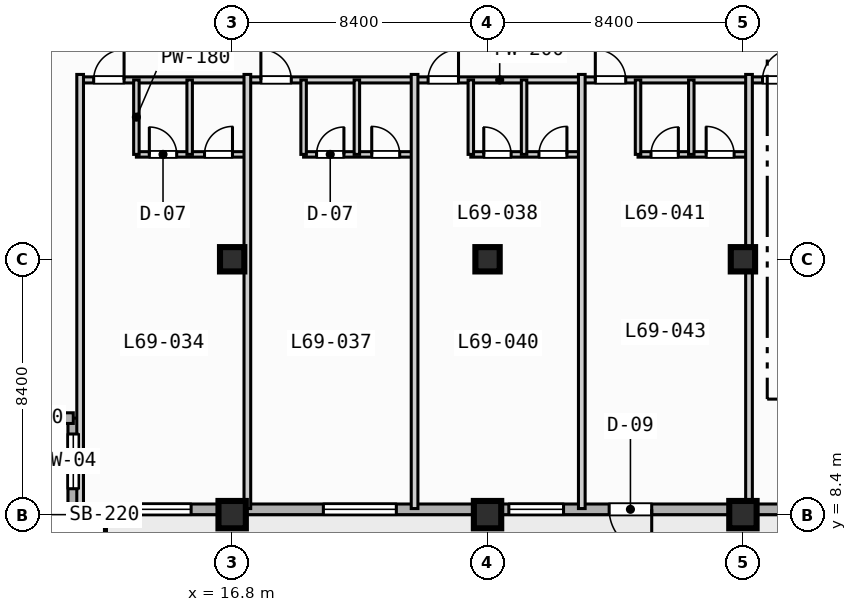
"""IFC4 building model, lengths in metres.
Left out: names, types, materials, properties, quantities, classifications, styles, units other than length and angle.
Written with IfcOpenShell. Run it as: python <this file> out.ifc"""

import sys

from ifc_helpers import new_model, si_unit, direction, frame, frame_2d, origin, origin_2d, place, context, subcontext, project, spatial, rectangle, extrude, element, fill, save


model = new_model("IFC4")
c1 = context("Model", 3, precision=1e-05, world=origin(), true_north=direction((0.0, 1.0)))
c2 = subcontext(c1, "Body", "Model", "MODEL_VIEW")
j1 = project(units=[si_unit("LENGTHUNIT", "METRE"), si_unit("PLANEANGLEUNIT", "RADIAN")], contexts=[c1])
p1 = place(None, origin())
s1 = spatial("IfcSite", under=j1, at=p1, CompositionType="ELEMENT")
p2 = place(p1, origin())
s2 = spatial("IfcBuilding", under=s1, at=p2, CompositionType="ELEMENT")
p3 = place(p2, frame((0.0, 0.0, 278.6)))
s3 = spatial("IfcBuildingStorey", under=s2, at=p3, CompositionType="ELEMENT", Elevation=278.6)
p4 = place(p3, frame((16.8, 8.4, 0.0), z_axis=(0.0, 0.0, 1.0), x_axis=(1.0, 0.0, 0.0)))
e1 = element("IfcColumn", 1, at=p4, inside=s3, PredefinedType="COLUMN", context=c2, shape_type="SweptSolid", body=[
    extrude(rectangle(XDim=0.9, YDim=0.9, at=origin_2d()), origin(), (0.0, 0.0, 1.0), 3.7),
])
p5 = place(p3, frame((16.8, 16.8, 0.0), z_axis=(0.0, 0.0, 1.0), x_axis=(1.0, 0.0, 0.0)))
e2 = element("IfcColumn", 2, at=p5, inside=s3, PredefinedType="COLUMN", context=c2, shape_type="SweptSolid", body=[
    extrude(rectangle(XDim=0.8, YDim=0.8, at=origin_2d()), origin(), (0.0, 0.0, 1.0), 3.7),
])
p6 = place(p3, frame((25.2, 8.4, 0.0), z_axis=(0.0, 0.0, 1.0), x_axis=(1.0, 0.0, 0.0)))
e3 = element("IfcColumn", 3, at=p6, inside=s3, PredefinedType="COLUMN", context=c2, shape_type="SweptSolid", body=[
    extrude(rectangle(XDim=0.9, YDim=0.9, at=origin_2d()), origin(), (0.0, 0.0, 1.0), 3.7),
])
p7 = place(p3, frame((25.2, 16.8, 0.0), z_axis=(0.0, 0.0, 1.0), x_axis=(1.0, 0.0, 0.0)))
e4 = element("IfcColumn", 4, at=p7, inside=s3, PredefinedType="COLUMN", context=c2, shape_type="SweptSolid", body=[
    extrude(rectangle(XDim=0.8, YDim=0.8, at=origin_2d()), origin(), (0.0, 0.0, 1.0), 3.7),
])
p8 = place(p3, frame((33.6, 8.4, 0.0), z_axis=(0.0, 0.0, 1.0), x_axis=(1.0, 0.0, 0.0)))
e5 = element("IfcColumn", 5, at=p8, inside=s3, PredefinedType="COLUMN", context=c2, shape_type="SweptSolid", body=[
    extrude(rectangle(XDim=0.9, YDim=0.9, at=origin_2d()), origin(), (0.0, 0.0, 1.0), 3.7),
])
p9 = place(p3, frame((33.6, 16.8, 0.0), z_axis=(0.0, 0.0, 1.0), x_axis=(1.0, 0.0, 0.0)))
e6 = element("IfcColumn", 6, at=p9, inside=s3, PredefinedType="COLUMN", context=c2, shape_type="SweptSolid", body=[
    extrude(rectangle(XDim=0.8, YDim=0.8, at=origin_2d()), origin(), (0.0, 0.0, 1.0), 3.7),
])
p10 = place(p3, frame((11.575, 8.575, 0.0), z_axis=(0.0, 0.0, 1.0), x_axis=(0.0, 1.0, 0.0)))
e7 = element("IfcWall", 7, at=p10, inside=s3, PredefinedType="STANDARD", context=c2, shape_type="SweptSolid", body=[
    extrude(rectangle(XDim=3.0, YDim=0.35, at=frame_2d((1.5, 0.0))), origin(), (0.0, 0.0, 1.0), 3.47),
])
p11 = place(p10, frame((0.677, 0.0, 0.85)))
e8 = element("IfcOpeningElement", 8, at=p11, cuts=e7, PredefinedType="OPENING", context=c2, shape_type="SweptSolid", body=[
    extrude(rectangle(XDim=1.8, YDim=1.8, at=frame_2d((0.9, 0.9))), frame((0.0, 0.185, 0.0), z_axis=(0.0, -1.0, 0.0), x_axis=(1.0, 0.0, 0.0)), (0.0, 0.0, 1.0), 0.37),
])
p12 = place(p3, frame((11.575, 11.575, 0.0), z_axis=(0.0, 0.0, 1.0), x_axis=(-1.0, 0.0, 0.0)))
e9 = element("IfcWall", 9, at=p12, inside=s3, PredefinedType="STANDARD", context=c2, shape_type="SweptSolid", body=[
    extrude(rectangle(XDim=3.0, YDim=0.35, at=frame_2d((1.5, 0.0))), origin(), (0.0, 0.0, 1.0), 3.47),
])
p13 = place(p3, frame((72.425, 8.575, 0.0), z_axis=(0.0, 0.0, 1.0), x_axis=(-1.0, 0.0, 0.0)))
e10 = element("IfcWall", 10, at=p13, inside=s3, PredefinedType="STANDARD", context=c2, shape_type="SweptSolid", body=[
    extrude(rectangle(XDim=60.85, YDim=0.35, at=frame_2d((30.425, 0.0))), origin(), (0.0, 0.0, 1.0), 3.47),
])
p14 = place(p13, frame((41.825, 0.0, 0.0)))
e11 = element("IfcOpeningElement", 11, at=p14, cuts=e10, PredefinedType="OPENING", context=c2, shape_type="SweptSolid", body=[
    extrude(rectangle(XDim=1.4, YDim=2.2, at=frame_2d((0.7, 1.1))), frame((0.0, 0.185, 0.0), z_axis=(0.0, -1.0, 0.0), x_axis=(1.0, 0.0, 0.0)), (0.0, 0.0, 1.0), 0.37),
])
p15 = place(p13, frame((50.225, 0.0, 0.85)))
e12 = element("IfcOpeningElement", 12, at=p15, cuts=e10, PredefinedType="OPENING", context=c2, shape_type="SweptSolid", body=[
    extrude(rectangle(XDim=2.4, YDim=1.95, at=frame_2d((1.2, 0.975))), frame((0.0, 0.185, 0.0), z_axis=(0.0, -1.0, 0.0), x_axis=(1.0, 0.0, 0.0)), (0.0, 0.0, 1.0), 0.37),
])
p16 = place(p13, frame((33.425, 0.0, 0.85)))
e13 = element("IfcOpeningElement", 13, at=p16, cuts=e10, PredefinedType="OPENING", context=c2, shape_type="SweptSolid", body=[
    extrude(rectangle(XDim=2.4, YDim=1.95, at=frame_2d((1.2, 0.975))), frame((0.0, 0.185, 0.0), z_axis=(0.0, -1.0, 0.0), x_axis=(1.0, 0.0, 0.0)), (0.0, 0.0, 1.0), 0.37),
])
p17 = place(p13, frame((25.325, 0.0, 0.85)))
e14 = element("IfcOpeningElement", 14, at=p17, cuts=e10, PredefinedType="OPENING", context=c2, shape_type="SweptSolid", body=[
    extrude(rectangle(XDim=1.8, YDim=1.8, at=frame_2d((0.9, 0.9))), frame((0.0, 0.185, 0.0), z_axis=(0.0, -1.0, 0.0), x_axis=(1.0, 0.0, 0.0)), (0.0, 0.0, 1.0), 0.37),
])
p18 = place(p13, frame((56.975, 0.0, 0.85)))
e15 = element("IfcOpeningElement", 15, at=p18, cuts=e10, PredefinedType="OPENING", context=c2, shape_type="SweptSolid", body=[
    extrude(rectangle(XDim=1.8, YDim=1.8, at=frame_2d((0.9, 0.9))), frame((0.0, 0.185, 0.0), z_axis=(0.0, -1.0, 0.0), x_axis=(1.0, 0.0, 0.0)), (0.0, 0.0, 1.0), 0.37),
])
p19 = place(p13, frame((44.725, 0.0, 0.85)))
e16 = element("IfcOpeningElement", 16, at=p19, cuts=e10, PredefinedType="OPENING", context=c2, shape_type="SweptSolid", body=[
    extrude(rectangle(XDim=1.8, YDim=1.8, at=frame_2d((0.9, 0.9))), frame((0.0, 0.185, 0.0), z_axis=(0.0, -1.0, 0.0), x_axis=(1.0, 0.0, 0.0)), (0.0, 0.0, 1.0), 0.37),
])
p20 = place(p3, frame((11.8, 22.7, 0.0), z_axis=(0.0, 0.0, 1.0), x_axis=(1.0, 0.0, 0.0)))
e17 = element("IfcWall", 17, at=p20, inside=s3, PredefinedType="PARTITIONING", context=c2, shape_type="SweptSolid", body=[
    extrude(rectangle(XDim=27.6, YDim=0.2, at=frame_2d((13.8, 0.0))), origin(), (0.0, 0.0, 1.0), 3.47),
])
p21 = place(p20, frame((0.445, 0.0, 0.0)))
e18 = element("IfcOpeningElement", 18, at=p21, cuts=e17, PredefinedType="OPENING", context=c2, shape_type="SweptSolid", body=[
    extrude(rectangle(XDim=1.0, YDim=2.15, at=frame_2d((0.5, 1.075))), frame((0.0, 0.11, 0.0), z_axis=(0.0, -1.0, 0.0), x_axis=(1.0, 0.0, 0.0)), (0.0, 0.0, 1.0), 0.22),
])
p22 = place(p20, frame((5.945, 0.0, 0.0)))
e19 = element("IfcOpeningElement", 19, at=p22, cuts=e17, PredefinedType="OPENING", context=c2, shape_type="SweptSolid", body=[
    extrude(rectangle(XDim=1.0, YDim=2.15, at=frame_2d((0.5, 1.075))), frame((0.0, 0.11, 0.0), z_axis=(0.0, -1.0, 0.0), x_axis=(1.0, 0.0, 0.0)), (0.0, 0.0, 1.0), 0.22),
])
p23 = place(p20, frame((11.445, 0.0, 0.0)))
e20 = element("IfcOpeningElement", 20, at=p23, cuts=e17, PredefinedType="OPENING", context=c2, shape_type="SweptSolid", body=[
    extrude(rectangle(XDim=1.0, YDim=2.15, at=frame_2d((0.5, 1.075))), frame((0.0, 0.11, 0.0), z_axis=(0.0, -1.0, 0.0), x_axis=(1.0, 0.0, 0.0)), (0.0, 0.0, 1.0), 0.22),
])
p24 = place(p20, frame((16.945, 0.0, 0.0)))
e21 = element("IfcOpeningElement", 21, at=p24, cuts=e17, PredefinedType="OPENING", context=c2, shape_type="SweptSolid", body=[
    extrude(rectangle(XDim=1.0, YDim=2.15, at=frame_2d((0.5, 1.075))), frame((0.0, 0.11, 0.0), z_axis=(0.0, -1.0, 0.0), x_axis=(1.0, 0.0, 0.0)), (0.0, 0.0, 1.0), 0.22),
])
p25 = place(p20, frame((22.445, 0.0, 0.0)))
e22 = element("IfcOpeningElement", 22, at=p25, cuts=e17, PredefinedType="OPENING", context=c2, shape_type="SweptSolid", body=[
    extrude(rectangle(XDim=1.0, YDim=2.15, at=frame_2d((0.5, 1.075))), frame((0.0, 0.11, 0.0), z_axis=(0.0, -1.0, 0.0), x_axis=(1.0, 0.0, 0.0)), (0.0, 0.0, 1.0), 0.22),
])
p26 = place(p3, frame((11.8, 8.6, 0.0), z_axis=(0.0, 0.0, 1.0), x_axis=(0.0, 1.0, 0.0)))
e23 = element("IfcWall", 23, at=p26, inside=s3, PredefinedType="PARTITIONING", context=c2, shape_type="SweptSolid", body=[
    extrude(rectangle(XDim=14.28, YDim=0.22, at=frame_2d((7.14, 0.0))), origin(), (0.0, 0.0, 1.0), 3.47),
])
p27 = place(p3, frame((13.65, 20.25, 0.0), z_axis=(0.0, 0.0, 1.0), x_axis=(1.0, 0.0, 0.0)))
e24 = element("IfcWall", 24, at=p27, inside=s3, PredefinedType="PLUMBINGWALL", context=c2, shape_type="SweptSolid", body=[
    extrude(rectangle(XDim=3.65, YDim=0.18, at=frame_2d((1.825, 0.0))), origin(), (0.0, 0.0, 1.0), 3.47),
])
p28 = place(p27, frame((0.426, 0.0, 0.0)))
e25 = element("IfcOpeningElement", 25, at=p28, cuts=e24, PredefinedType="OPENING", context=c2, shape_type="SweptSolid", body=[
    extrude(rectangle(XDim=0.9, YDim=2.1, at=frame_2d((0.45, 1.05))), frame((0.0, 0.1, 0.0), z_axis=(0.0, -1.0, 0.0), x_axis=(1.0, 0.0, 0.0)), (0.0, 0.0, 1.0), 0.2),
])
p29 = place(p27, frame((2.241, 0.0, 0.0)))
e26 = element("IfcOpeningElement", 26, at=p29, cuts=e24, PredefinedType="OPENING", context=c2, shape_type="SweptSolid", body=[
    extrude(rectangle(XDim=0.92, YDim=2.1, at=frame_2d((0.46, 1.05))), frame((0.0, 0.1, 0.0), z_axis=(0.0, -1.0, 0.0), x_axis=(1.0, 0.0, 0.0)), (0.0, 0.0, 1.0), 0.2),
])
for number, where, z_axis, x_axis in (
    (27, (13.65, 20.25, 0.0), (0.0, 0.0, 1.0), (0.0, 1.0, 0.0)),
    (28, (15.402, 20.25, 0.0), (0.0, 0.0, 1.0), (0.0, 1.0, 0.0)),
):
    element("IfcWall", number, at=place(p3, frame(where, z_axis=z_axis, x_axis=x_axis)), inside=s3, PredefinedType="PLUMBINGWALL", context=c2, shape_type="SweptSolid", body=[
        extrude(rectangle(XDim=2.45, YDim=0.18, at=frame_2d((1.225, 0.0))), origin(), (0.0, 0.0, 1.0), 3.47),
    ])
p30 = place(p3, frame((17.3, 8.6, 0.0), z_axis=(0.0, 0.0, 1.0), x_axis=(0.0, 1.0, 0.0)))
e29 = element("IfcWall", 29, at=p30, inside=s3, PredefinedType="PARTITIONING", context=c2, shape_type="SweptSolid", body=[
    extrude(rectangle(XDim=14.28, YDim=0.22, at=frame_2d((7.14, 0.0))), origin(), (0.0, 0.0, 1.0), 3.47),
])
p31 = place(p3, frame((19.15, 20.25, 0.0), z_axis=(0.0, 0.0, 1.0), x_axis=(1.0, 0.0, 0.0)))
e30 = element("IfcWall", 30, at=p31, inside=s3, PredefinedType="PLUMBINGWALL", context=c2, shape_type="SweptSolid", body=[
    extrude(rectangle(XDim=3.65, YDim=0.18, at=frame_2d((1.825, 0.0))), origin(), (0.0, 0.0, 1.0), 3.47),
])
p32 = place(p31, frame((0.426, 0.0, 0.0)))
e31 = element("IfcOpeningElement", 31, at=p32, cuts=e30, PredefinedType="OPENING", context=c2, shape_type="SweptSolid", body=[
    extrude(rectangle(XDim=0.9, YDim=2.1, at=frame_2d((0.45, 1.05))), frame((0.0, 0.1, 0.0), z_axis=(0.0, -1.0, 0.0), x_axis=(1.0, 0.0, 0.0)), (0.0, 0.0, 1.0), 0.2),
])
p33 = place(p31, frame((2.241, 0.0, 0.0)))
e32 = element("IfcOpeningElement", 32, at=p33, cuts=e30, PredefinedType="OPENING", context=c2, shape_type="SweptSolid", body=[
    extrude(rectangle(XDim=0.92, YDim=2.1, at=frame_2d((0.46, 1.05))), frame((0.0, 0.1, 0.0), z_axis=(0.0, -1.0, 0.0), x_axis=(1.0, 0.0, 0.0)), (0.0, 0.0, 1.0), 0.2),
])
for number, where, z_axis, x_axis in (
    (33, (19.15, 20.25, 0.0), (0.0, 0.0, 1.0), (0.0, 1.0, 0.0)),
    (34, (20.902, 20.25, 0.0), (0.0, 0.0, 1.0), (0.0, 1.0, 0.0)),
):
    element("IfcWall", number, at=place(p3, frame(where, z_axis=z_axis, x_axis=x_axis)), inside=s3, PredefinedType="PLUMBINGWALL", context=c2, shape_type="SweptSolid", body=[
        extrude(rectangle(XDim=2.45, YDim=0.18, at=frame_2d((1.225, 0.0))), origin(), (0.0, 0.0, 1.0), 3.47),
    ])
p34 = place(p3, frame((22.8, 8.6, 0.0), z_axis=(0.0, 0.0, 1.0), x_axis=(0.0, 1.0, 0.0)))
e35 = element("IfcWall", 35, at=p34, inside=s3, PredefinedType="PARTITIONING", context=c2, shape_type="SweptSolid", body=[
    extrude(rectangle(XDim=14.28, YDim=0.22, at=frame_2d((7.14, 0.0))), origin(), (0.0, 0.0, 1.0), 3.47),
])
p35 = place(p3, frame((24.65, 20.25, 0.0), z_axis=(0.0, 0.0, 1.0), x_axis=(1.0, 0.0, 0.0)))
e36 = element("IfcWall", 36, at=p35, inside=s3, PredefinedType="PLUMBINGWALL", context=c2, shape_type="SweptSolid", body=[
    extrude(rectangle(XDim=3.65, YDim=0.18, at=frame_2d((1.825, 0.0))), origin(), (0.0, 0.0, 1.0), 3.47),
])
p36 = place(p35, frame((0.426, 0.0, 0.0)))
e37 = element("IfcOpeningElement", 37, at=p36, cuts=e36, PredefinedType="OPENING", context=c2, shape_type="SweptSolid", body=[
    extrude(rectangle(XDim=0.9, YDim=2.1, at=frame_2d((0.45, 1.05))), frame((0.0, 0.1, 0.0), z_axis=(0.0, -1.0, 0.0), x_axis=(1.0, 0.0, 0.0)), (0.0, 0.0, 1.0), 0.2),
])
p37 = place(p35, frame((2.241, 0.0, 0.0)))
e38 = element("IfcOpeningElement", 38, at=p37, cuts=e36, PredefinedType="OPENING", context=c2, shape_type="SweptSolid", body=[
    extrude(rectangle(XDim=0.92, YDim=2.1, at=frame_2d((0.46, 1.05))), frame((0.0, 0.1, 0.0), z_axis=(0.0, -1.0, 0.0), x_axis=(1.0, 0.0, 0.0)), (0.0, 0.0, 1.0), 0.2),
])
for number, where, z_axis, x_axis in (
    (39, (24.65, 20.25, 0.0), (0.0, 0.0, 1.0), (0.0, 1.0, 0.0)),
    (40, (26.402, 20.25, 0.0), (0.0, 0.0, 1.0), (0.0, 1.0, 0.0)),
):
    element("IfcWall", number, at=place(p3, frame(where, z_axis=z_axis, x_axis=x_axis)), inside=s3, PredefinedType="PLUMBINGWALL", context=c2, shape_type="SweptSolid", body=[
        extrude(rectangle(XDim=2.45, YDim=0.18, at=frame_2d((1.225, 0.0))), origin(), (0.0, 0.0, 1.0), 3.47),
    ])
p38 = place(p3, frame((28.3, 8.6, 0.0), z_axis=(0.0, 0.0, 1.0), x_axis=(0.0, 1.0, 0.0)))
e41 = element("IfcWall", 41, at=p38, inside=s3, PredefinedType="PARTITIONING", context=c2, shape_type="SweptSolid", body=[
    extrude(rectangle(XDim=14.28, YDim=0.22, at=frame_2d((7.14, 0.0))), origin(), (0.0, 0.0, 1.0), 3.47),
])
p39 = place(p3, frame((30.15, 20.25, 0.0), z_axis=(0.0, 0.0, 1.0), x_axis=(1.0, 0.0, 0.0)))
e42 = element("IfcWall", 42, at=p39, inside=s3, PredefinedType="PLUMBINGWALL", context=c2, shape_type="SweptSolid", body=[
    extrude(rectangle(XDim=3.65, YDim=0.18, at=frame_2d((1.825, 0.0))), origin(), (0.0, 0.0, 1.0), 3.47),
])
p40 = place(p39, frame((0.426, 0.0, 0.0)))
e43 = element("IfcOpeningElement", 43, at=p40, cuts=e42, PredefinedType="OPENING", context=c2, shape_type="SweptSolid", body=[
    extrude(rectangle(XDim=0.9, YDim=2.1, at=frame_2d((0.45, 1.05))), frame((0.0, 0.1, 0.0), z_axis=(0.0, -1.0, 0.0), x_axis=(1.0, 0.0, 0.0)), (0.0, 0.0, 1.0), 0.2),
])
p41 = place(p39, frame((2.241, 0.0, 0.0)))
e44 = element("IfcOpeningElement", 44, at=p41, cuts=e42, PredefinedType="OPENING", context=c2, shape_type="SweptSolid", body=[
    extrude(rectangle(XDim=0.92, YDim=2.1, at=frame_2d((0.46, 1.05))), frame((0.0, 0.1, 0.0), z_axis=(0.0, -1.0, 0.0), x_axis=(1.0, 0.0, 0.0)), (0.0, 0.0, 1.0), 0.2),
])
for number, where, z_axis, x_axis in (
    (45, (30.15, 20.25, 0.0), (0.0, 0.0, 1.0), (0.0, 1.0, 0.0)),
    (46, (31.902, 20.25, 0.0), (0.0, 0.0, 1.0), (0.0, 1.0, 0.0)),
):
    element("IfcWall", number, at=place(p3, frame(where, z_axis=z_axis, x_axis=x_axis)), inside=s3, PredefinedType="PLUMBINGWALL", context=c2, shape_type="SweptSolid", body=[
        extrude(rectangle(XDim=2.45, YDim=0.18, at=frame_2d((1.225, 0.0))), origin(), (0.0, 0.0, 1.0), 3.47),
    ])
p42 = place(p3, frame((33.8, 8.6, 0.0), z_axis=(0.0, 0.0, 1.0), x_axis=(0.0, 1.0, 0.0)))
e47 = element("IfcWall", 47, at=p42, inside=s3, PredefinedType="PARTITIONING", context=c2, shape_type="SweptSolid", body=[
    extrude(rectangle(XDim=14.28, YDim=0.22, at=frame_2d((7.14, 0.0))), origin(), (0.0, 0.0, 1.0), 2.82),
])
p43 = place(p11, origin())
e48 = element("IfcWindow", 48, at=p43, inside=s3, PartitioningType="SINGLE_PANEL", PredefinedType="WINDOW", context=c2, shape_type="SweptSolid", body=[
    extrude(rectangle(XDim=1.8, YDim=1.8, at=frame_2d((0.9, 0.9))), frame((0.0, 0.03, 0.0), z_axis=(0.0, -1.0, 0.0), x_axis=(1.0, 0.0, 0.0)), (0.0, 0.0, 1.0), 0.06),
])
fill(e8, e48)
p44 = place(p14, origin())
e49 = element("IfcDoor", 49, at=p44, inside=s3, OperationType="SINGLE_SWING_LEFT", PredefinedType="DOOR", context=c2, shape_type="SweptSolid", body=[
    extrude(rectangle(XDim=1.4, YDim=2.2, at=frame_2d((0.7, 1.1))), frame((0.0, 0.025, 0.0), z_axis=(0.0, -1.0, 0.0), x_axis=(1.0, 0.0, 0.0)), (0.0, 0.0, 1.0), 0.05),
])
fill(e11, e49)
p45 = place(p15, origin())
e50 = element("IfcWindow", 50, at=p45, inside=s3, PartitioningType="SINGLE_PANEL", PredefinedType="WINDOW", context=c2, shape_type="SweptSolid", body=[
    extrude(rectangle(XDim=2.4, YDim=1.95, at=frame_2d((1.2, 0.975))), frame((0.0, 0.03, 0.0), z_axis=(0.0, -1.0, 0.0), x_axis=(1.0, 0.0, 0.0)), (0.0, 0.0, 1.0), 0.06),
])
fill(e12, e50)
p46 = place(p18, origin())
e51 = element("IfcWindow", 51, at=p46, inside=s3, PartitioningType="SINGLE_PANEL", PredefinedType="WINDOW", context=c2, shape_type="SweptSolid", body=[
    extrude(rectangle(XDim=1.8, YDim=1.8, at=frame_2d((0.9, 0.9))), frame((0.0, 0.03, 0.0), z_axis=(0.0, -1.0, 0.0), x_axis=(1.0, 0.0, 0.0)), (0.0, 0.0, 1.0), 0.06),
])
fill(e15, e51)
p47 = place(p19, origin())
e52 = element("IfcWindow", 52, at=p47, inside=s3, PartitioningType="SINGLE_PANEL", PredefinedType="WINDOW", context=c2, shape_type="SweptSolid", body=[
    extrude(rectangle(XDim=1.8, YDim=1.8, at=frame_2d((0.9, 0.9))), frame((0.0, 0.03, 0.0), z_axis=(0.0, -1.0, 0.0), x_axis=(1.0, 0.0, 0.0)), (0.0, 0.0, 1.0), 0.06),
])
fill(e16, e52)
p48 = place(p21, origin())
e53 = element("IfcDoor", 53, at=p48, inside=s3, OperationType="SINGLE_SWING_RIGHT", PredefinedType="DOOR", context=c2, shape_type="SweptSolid", body=[
    extrude(rectangle(XDim=1.0, YDim=2.15, at=frame_2d((0.5, 1.075))), frame((0.0, 0.025, 0.0), z_axis=(0.0, -1.0, 0.0), x_axis=(1.0, 0.0, 0.0)), (0.0, 0.0, 1.0), 0.05),
])
fill(e18, e53)
p49 = place(p22, origin())
e54 = element("IfcDoor", 54, at=p49, inside=s3, OperationType="SINGLE_SWING_LEFT", PredefinedType="DOOR", context=c2, shape_type="SweptSolid", body=[
    extrude(rectangle(XDim=1.0, YDim=2.15, at=frame_2d((0.5, 1.075))), frame((0.0, 0.025, 0.0), z_axis=(0.0, -1.0, 0.0), x_axis=(1.0, 0.0, 0.0)), (0.0, 0.0, 1.0), 0.05),
])
fill(e19, e54)
p50 = place(p23, origin())
e55 = element("IfcDoor", 55, at=p50, inside=s3, OperationType="SINGLE_SWING_RIGHT", PredefinedType="DOOR", context=c2, shape_type="SweptSolid", body=[
    extrude(rectangle(XDim=1.0, YDim=2.15, at=frame_2d((0.5, 1.075))), frame((0.0, 0.025, 0.0), z_axis=(0.0, -1.0, 0.0), x_axis=(1.0, 0.0, 0.0)), (0.0, 0.0, 1.0), 0.05),
])
fill(e20, e55)
p51 = place(p24, origin())
e56 = element("IfcDoor", 56, at=p51, inside=s3, OperationType="SINGLE_SWING_LEFT", PredefinedType="DOOR", context=c2, shape_type="SweptSolid", body=[
    extrude(rectangle(XDim=1.0, YDim=2.15, at=frame_2d((0.5, 1.075))), frame((0.0, 0.025, 0.0), z_axis=(0.0, -1.0, 0.0), x_axis=(1.0, 0.0, 0.0)), (0.0, 0.0, 1.0), 0.05),
])
fill(e21, e56)
p52 = place(p25, origin())
e57 = element("IfcDoor", 57, at=p52, inside=s3, OperationType="SINGLE_SWING_RIGHT", PredefinedType="DOOR", context=c2, shape_type="SweptSolid", body=[
    extrude(rectangle(XDim=1.0, YDim=2.15, at=frame_2d((0.5, 1.075))), frame((0.0, 0.025, 0.0), z_axis=(0.0, -1.0, 0.0), x_axis=(1.0, 0.0, 0.0)), (0.0, 0.0, 1.0), 0.05),
])
fill(e22, e57)
p53 = place(p28, origin())
e58 = element("IfcDoor", 58, at=p53, inside=s3, OperationType="SINGLE_SWING_LEFT", PredefinedType="DOOR", context=c2, shape_type="SweptSolid", body=[
    extrude(rectangle(XDim=0.9, YDim=2.1, at=frame_2d((0.45, 1.05))), frame((0.0, 0.025, 0.0), z_axis=(0.0, -1.0, 0.0), x_axis=(1.0, 0.0, 0.0)), (0.0, 0.0, 1.0), 0.05),
])
fill(e25, e58)
p54 = place(p29, origin())
e59 = element("IfcDoor", 59, at=p54, inside=s3, OperationType="SINGLE_SWING_RIGHT", PredefinedType="DOOR", context=c2, shape_type="SweptSolid", body=[
    extrude(rectangle(XDim=0.92, YDim=2.1, at=frame_2d((0.46, 1.05))), frame((0.0, 0.025, 0.0), z_axis=(0.0, -1.0, 0.0), x_axis=(1.0, 0.0, 0.0)), (0.0, 0.0, 1.0), 0.05),
])
fill(e26, e59)
p55 = place(p32, origin())
e60 = element("IfcDoor", 60, at=p55, inside=s3, OperationType="SINGLE_SWING_RIGHT", PredefinedType="DOOR", context=c2, shape_type="SweptSolid", body=[
    extrude(rectangle(XDim=0.9, YDim=2.1, at=frame_2d((0.45, 1.05))), frame((0.0, 0.025, 0.0), z_axis=(0.0, -1.0, 0.0), x_axis=(1.0, 0.0, 0.0)), (0.0, 0.0, 1.0), 0.05),
])
fill(e31, e60)
p56 = place(p33, origin())
e61 = element("IfcDoor", 61, at=p56, inside=s3, OperationType="SINGLE_SWING_LEFT", PredefinedType="DOOR", context=c2, shape_type="SweptSolid", body=[
    extrude(rectangle(XDim=0.92, YDim=2.1, at=frame_2d((0.46, 1.05))), frame((0.0, 0.025, 0.0), z_axis=(0.0, -1.0, 0.0), x_axis=(1.0, 0.0, 0.0)), (0.0, 0.0, 1.0), 0.05),
])
fill(e32, e61)
p57 = place(p36, origin())
e62 = element("IfcDoor", 62, at=p57, inside=s3, OperationType="SINGLE_SWING_LEFT", PredefinedType="DOOR", context=c2, shape_type="SweptSolid", body=[
    extrude(rectangle(XDim=0.9, YDim=2.1, at=frame_2d((0.45, 1.05))), frame((0.0, 0.025, 0.0), z_axis=(0.0, -1.0, 0.0), x_axis=(1.0, 0.0, 0.0)), (0.0, 0.0, 1.0), 0.05),
])
fill(e37, e62)
p58 = place(p37, origin())
e63 = element("IfcDoor", 63, at=p58, inside=s3, OperationType="SINGLE_SWING_RIGHT", PredefinedType="DOOR", context=c2, shape_type="SweptSolid", body=[
    extrude(rectangle(XDim=0.92, YDim=2.1, at=frame_2d((0.46, 1.05))), frame((0.0, 0.025, 0.0), z_axis=(0.0, -1.0, 0.0), x_axis=(1.0, 0.0, 0.0)), (0.0, 0.0, 1.0), 0.05),
])
fill(e38, e63)
p59 = place(p40, origin())
e64 = element("IfcDoor", 64, at=p59, inside=s3, OperationType="SINGLE_SWING_RIGHT", PredefinedType="DOOR", context=c2, shape_type="SweptSolid", body=[
    extrude(rectangle(XDim=0.9, YDim=2.1, at=frame_2d((0.45, 1.05))), frame((0.0, 0.025, 0.0), z_axis=(0.0, -1.0, 0.0), x_axis=(1.0, 0.0, 0.0)), (0.0, 0.0, 1.0), 0.05),
])
fill(e43, e64)
p60 = place(p41, origin())
e65 = element("IfcDoor", 65, at=p60, inside=s3, OperationType="SINGLE_SWING_LEFT", PredefinedType="DOOR", context=c2, shape_type="SweptSolid", body=[
    extrude(rectangle(XDim=0.92, YDim=2.1, at=frame_2d((0.46, 1.05))), frame((0.0, 0.025, 0.0), z_axis=(0.0, -1.0, 0.0), x_axis=(1.0, 0.0, 0.0)), (0.0, 0.0, 1.0), 0.05),
])
fill(e44, e65)
save(model, sys.argv[1])
